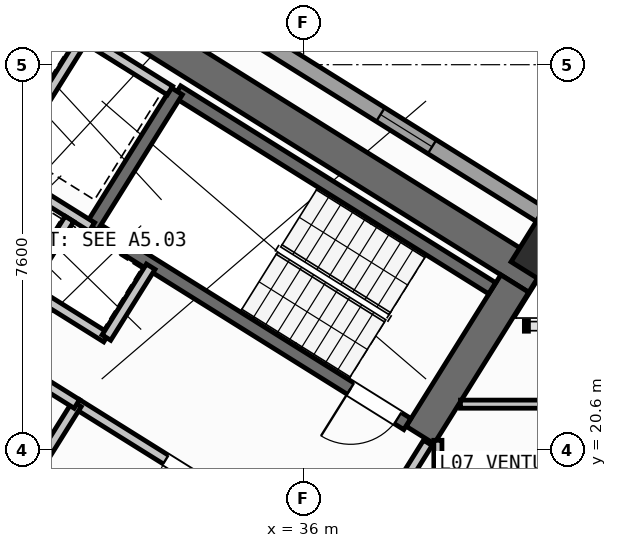
"""IFC4 building model, lengths in metres.
Left out: names, types, materials, properties, quantities, classifications, styles, units other than length and angle.
Written with IfcOpenShell. Run it as: python <this file> out.ifc"""

import sys

from ifc_helpers import new_model, si_unit, direction, frame, frame_2d, origin, origin_2d, place, context, subcontext, project, spatial, rectangle, hollow_rectangle, extrude, source, transform, mapped, element, fill, save


model = new_model("IFC4")
c1 = context("Model", 3, precision=1e-05, world=origin(), true_north=direction((0.0, 1.0)))
c2 = subcontext(c1, "Body", "Model", "MODEL_VIEW")
j1 = project(units=[si_unit("LENGTHUNIT", "METRE"), si_unit("PLANEANGLEUNIT", "RADIAN")], contexts=[c1])
p1 = place(None, origin())
s1 = spatial("IfcSite", under=j1, at=p1, CompositionType="ELEMENT")
p2 = place(p1, origin())
s2 = spatial("IfcBuilding", under=s1, at=p2, CompositionType="ELEMENT")
p3 = place(p2, frame((0.0, 0.0, 31.2)))
s3 = spatial("IfcBuildingStorey", under=s2, at=p3, CompositionType="ELEMENT", Elevation=31.2)
p4 = place(p3, frame((40.615, 23.983, 0.0), z_axis=(0.0, 0.0, 1.0), x_axis=(-0.848045953968, 0.529922692436, 0.0)))
e1 = element("IfcWall", 1, at=p4, inside=s3, PredefinedType="SHEAR", context=c2, shape_type="SweptSolid", body=[
    extrude(rectangle(XDim=13.24, YDim=0.65, at=frame_2d((6.62, 0.0))), origin(), (0.0, 0.0, 1.0), 3.35),
])
p5 = place(p3, frame((40.168, 23.88, 0.0), z_axis=(0.0, 0.0, 1.0), x_axis=(-0.529893103397, -0.8480644427, 0.0)))
e2 = element("IfcWall", 2, at=p5, inside=s3, PredefinedType="SHEAR", context=c2, shape_type="SweptSolid", body=[
    extrude(rectangle(XDim=3.525, YDim=0.65, at=frame_2d((1.763, 0.0))), origin(), (0.0, 0.0, 1.0), 3.35),
])
m1 = source(origin(), c2, "Body", "SweptSolid", [
    extrude(hollow_rectangle(XDim=1.0, YDim=1.0, WallThickness=0.04, at=origin_2d()), origin(), (0.0, 0.0, 1.0), 3.6),
])
p6 = place(p3, frame((40.783, 24.469, 0.0), z_axis=(0.0, 0.0, 1.0), x_axis=(-0.848048096156, 0.529919264233, 0.0)))
e3 = element("IfcColumn", 3, at=p6, inside=s3, PredefinedType="COLUMN", context=c2, shape_type="MappedRepresentation", body=[
    mapped(m1, transform((0.0, 0.0, 0.0), scale=1.0)),
])
p7 = place(p3, frame((14.138, 41.825, 0.0), z_axis=(0.0, 0.0, 1.0), x_axis=(0.848046498049, -0.529921821731, 0.0)))
e4 = element("IfcWall", 4, at=p7, inside=s3, PredefinedType="STANDARD", context=c2, shape_type="SweptSolid", body=[
    extrude(rectangle(XDim=31.588, YDim=0.32, at=frame_2d((15.794, 0.0))), origin(), (0.0, 0.0, 1.0), 3.35),
])
p8 = place(p7, frame((3.369, 0.0, 0.0)))
e5 = element("IfcOpeningElement", 5, at=p8, cuts=e4, PredefinedType="OPENING", context=c2, shape_type="SweptSolid", body=[
    extrude(rectangle(XDim=1.05, YDim=2.15, at=frame_2d((0.525, 1.075))), frame((0.0, 0.17, 0.0), z_axis=(0.0, -1.0, 0.0), x_axis=(1.0, 0.0, 0.0)), (0.0, 0.0, 1.0), 0.34),
])
p9 = place(p7, frame((0.946, 0.0, 0.85)))
e6 = element("IfcOpeningElement", 6, at=p9, cuts=e4, PredefinedType="OPENING", context=c2, shape_type="SweptSolid", body=[
    extrude(rectangle(XDim=1.8, YDim=1.5, at=frame_2d((0.9, 0.75))), frame((0.0, 0.17, 0.0), z_axis=(0.0, -1.0, 0.0), x_axis=(1.0, 0.0, 0.0)), (0.0, 0.0, 1.0), 0.34),
])
p10 = place(p7, frame((8.46, 0.0, 0.85)))
e7 = element("IfcOpeningElement", 7, at=p10, cuts=e4, PredefinedType="OPENING", context=c2, shape_type="SweptSolid", body=[
    extrude(rectangle(XDim=1.8, YDim=1.5, at=frame_2d((0.9, 0.75))), frame((0.0, 0.17, 0.0), z_axis=(0.0, -1.0, 0.0), x_axis=(1.0, 0.0, 0.0)), (0.0, 0.0, 1.0), 0.34),
])
p11 = place(p7, frame((13.899, 0.0, 0.85)))
e8 = element("IfcOpeningElement", 8, at=p11, cuts=e4, PredefinedType="OPENING", context=c2, shape_type="SweptSolid", body=[
    extrude(rectangle(XDim=1.5, YDim=1.5, at=frame_2d((0.75, 0.75))), frame((0.0, 0.17, 0.0), z_axis=(0.0, -1.0, 0.0), x_axis=(1.0, 0.0, 0.0)), (0.0, 0.0, 1.0), 0.34),
])
p12 = place(p7, frame((22.019, 0.0, 0.95)))
e9 = element("IfcOpeningElement", 9, at=p12, cuts=e4, PredefinedType="OPENING", context=c2, shape_type="SweptSolid", body=[
    extrude(rectangle(XDim=1.2, YDim=1.4, at=frame_2d((0.6, 0.7))), frame((0.0, 0.17, 0.0), z_axis=(0.0, -1.0, 0.0), x_axis=(1.0, 0.0, 0.0)), (0.0, 0.0, 1.0), 0.34),
])
p13 = place(p7, frame((27.569, 0.0, 0.95)))
e10 = element("IfcOpeningElement", 10, at=p13, cuts=e4, PredefinedType="OPENING", context=c2, shape_type="SweptSolid", body=[
    extrude(rectangle(XDim=1.2, YDim=1.4, at=frame_2d((0.6, 0.7))), frame((0.0, 0.17, 0.0), z_axis=(0.0, -1.0, 0.0), x_axis=(1.0, 0.0, 0.0)), (0.0, 0.0, 1.0), 0.34),
])
p14 = place(p3, frame((31.28, 18.261, 0.0), z_axis=(0.0, 0.0, 1.0), x_axis=(-0.848051618787, 0.529913626805, 0.0)))
e11 = element("IfcWall", 11, at=p14, inside=s3, PredefinedType="SHEAR", context=c2, shape_type="SweptSolid", body=[
    extrude(rectangle(XDim=7.46, YDim=0.26, at=frame_2d((3.73, 0.0))), origin(), (0.0, 0.0, 1.0), 3.35),
])
p15 = place(p14, frame((0.36, 0.0, 0.0)))
e12 = element("IfcOpeningElement", 12, at=p15, cuts=e11, PredefinedType="OPENING", context=c2, shape_type="SweptSolid", body=[
    extrude(rectangle(XDim=0.86, YDim=2.05, at=frame_2d((0.43, 1.025))), frame((0.0, 0.14, 0.0), z_axis=(0.0, -1.0, 0.0), x_axis=(1.0, 0.0, 0.0)), (0.0, 0.0, 1.0), 0.28),
])
p16 = place(p3, frame((39.721, 23.788, 0.0), z_axis=(0.0, 0.0, 1.0), x_axis=(-0.848054434086, 0.529909121291, 0.0)))
e13 = element("IfcWall", 13, at=p16, inside=s3, PredefinedType="SHEAR", context=c2, shape_type="SweptSolid", body=[
    extrude(rectangle(XDim=7.33, YDim=0.26, at=frame_2d((3.665, 0.0))), origin(), (0.0, 0.0, 1.0), 3.35),
])
p17 = place(p3, frame((38.046, 21.108, 0.0), z_axis=(0.0, 0.0, 1.0), x_axis=(-0.848054434086, 0.529909121291, 0.0)))
e14 = element("IfcWall", 14, at=p17, inside=s3, PredefinedType="SHEAR", context=c2, shape_type="SweptSolid", body=[
    extrude(rectangle(XDim=7.33, YDim=0.26, at=frame_2d((3.665, 0.0))), origin(), (0.0, 0.0, 1.0), 3.35),
])
p18 = place(p17, frame((0.22, 0.0, 0.0)))
e15 = element("IfcOpeningElement", 15, at=p18, cuts=e14, PredefinedType="OPENING", context=c2, shape_type="SweptSolid", body=[
    extrude(rectangle(XDim=1.1, YDim=2.1, at=frame_2d((0.55, 1.05))), frame((0.0, 0.14, 0.0), z_axis=(0.0, -1.0, 0.0), x_axis=(1.0, 0.0, 0.0)), (0.0, 0.0, 1.0), 0.28),
])
p19 = place(p3, frame((33.496, 27.677, 0.0), z_axis=(0.0, 0.0, 1.0), x_axis=(-0.529908658664, -0.84805472316, 0.0)))
e16 = element("IfcWall", 16, at=p19, inside=s3, PredefinedType="SHEAR", context=c2, shape_type="SweptSolid", body=[
    extrude(rectangle(XDim=3.16, YDim=0.26, at=frame_2d((1.58, 0.0))), origin(), (0.0, 0.0, 1.0), 3.35),
])
p20 = place(p3, frame((36.374, 18.474, 0.0), z_axis=(0.0, 0.0, 1.0), x_axis=(-0.848051071577, 0.529914502535, 0.0)))
e17 = element("IfcWall", 17, at=p20, inside=s3, PredefinedType="STANDARD", context=c2, shape_type="SweptSolid", body=[
    extrude(rectangle(XDim=5.718, YDim=0.2, at=frame_2d((2.859, 0.0))), origin(), (0.0, 0.0, 1.0), 3.34),
])
p21 = place(p20, frame((2.498, 0.0, 0.0)))
e18 = element("IfcOpeningElement", 18, at=p21, cuts=e17, PredefinedType="OPENING", context=c2, shape_type="SweptSolid", body=[
    extrude(rectangle(XDim=1.15, YDim=2.1, at=frame_2d((0.575, 1.05))), frame((0.0, 0.11, 0.0), z_axis=(0.0, -1.0, 0.0), x_axis=(1.0, 0.0, 0.0)), (0.0, 0.0, 1.0), 0.22),
])
p22 = place(p3, frame((31.822, 24.998, 0.0), z_axis=(0.0, 0.0, 1.0), x_axis=(-0.848058348634, 0.529902856485, 0.0)))
e19 = element("IfcWall", 19, at=p22, inside=s3, PredefinedType="STANDARD", context=c2, shape_type="SweptSolid", body=[
    extrude(rectangle(XDim=4.568, YDim=0.2, at=frame_2d((2.284, 0.0))), origin(), (0.0, 0.0, 1.0), 3.34),
])
p23 = place(p3, frame((32.108, 22.814, 0.0), z_axis=(0.0, 0.0, 1.0), x_axis=(-0.848042229521, 0.529928652696, 0.0)))
e20 = element("IfcWall", 20, at=p23, inside=s3, PredefinedType="STANDARD", context=c2, shape_type="SweptSolid", body=[
    extrude(rectangle(XDim=5.62, YDim=0.2, at=frame_2d((2.81, 0.0))), origin(), (0.0, 0.0, 1.0), 3.34),
])
p24 = place(p3, frame((32.982, 24.213, 0.0), z_axis=(0.0, 0.0, 1.0), x_axis=(-0.529839334948, -0.84809803628, 0.0)))
e21 = element("IfcWall", 21, at=p24, inside=s3, PredefinedType="STANDARD", context=c2, shape_type="SweptSolid", body=[
    extrude(rectangle(XDim=1.65, YDim=0.2, at=frame_2d((0.825, 0.0))), origin(), (0.0, 0.0, 1.0), 3.34),
])
p25 = place(p3, frame((31.645, 28.716, 0.0), z_axis=(0.0, 0.0, 1.0), x_axis=(-0.52986693015, -0.848080795876, 0.0)))
e22 = element("IfcWall", 22, at=p25, inside=s3, PredefinedType="STANDARD", context=c2, shape_type="SweptSolid", body=[
    extrude(rectangle(XDim=2.66, YDim=0.2, at=frame_2d((1.33, 0.0))), origin(), (0.0, 0.0, 1.0), 3.34),
])
p26 = place(p3, frame((33.363, 27.69, 0.0), z_axis=(0.0, 0.0, 1.0), x_axis=(-0.848053806312, 0.529910125964, 0.0)))
e23 = element("IfcWall", 23, at=p26, inside=s3, PredefinedType="STANDARD", context=c2, shape_type="SweptSolid", body=[
    extrude(rectangle(XDim=4.448, YDim=0.2, at=frame_2d((2.224, 0.0))), origin(), (0.0, 0.0, 1.0), 3.34),
])
p27 = place(p3, frame((31.379, 25.156, 0.0), z_axis=(0.0, 0.0, 1.0), x_axis=(-0.529998940003, -0.847998304005, 0.0)))
e24 = element("IfcWall", 24, at=p27, inside=s3, PredefinedType="STANDARD", context=c2, shape_type="SweptSolid", body=[
    extrude(rectangle(XDim=1.58, YDim=0.2, at=frame_2d((0.79, 0.0))), origin(), (0.0, 0.0, 1.0), 3.34),
])
p28 = place(p3, frame((31.525, 21.504, 0.0), z_axis=(0.0, 0.0, 1.0), x_axis=(-0.529907497854, -0.848055448493, 0.0)))
e25 = element("IfcWall", 25, at=p28, inside=s3, PredefinedType="STANDARD", context=c2, shape_type="SweptSolid", body=[
    extrude(rectangle(XDim=2.88, YDim=0.2, at=frame_2d((1.44, 0.0))), origin(), (0.0, 0.0, 1.0), 3.34),
])
p29 = place(p3, frame((31.525, 21.504, 0.0), z_axis=(0.0, 0.0, 1.0), x_axis=(-0.848044998614, 0.529924221305, 0.0)))
e26 = element("IfcWall", 26, at=p29, inside=s3, PredefinedType="STANDARD", context=c2, shape_type="SweptSolid", body=[
    extrude(rectangle(XDim=6.168, YDim=0.2, at=frame_2d((3.084, 0.0))), origin(), (0.0, 0.0, 1.0), 3.34),
])
p30 = place(p29, frame((4.4, 0.0, 0.0)))
e27 = element("IfcOpeningElement", 27, at=p30, cuts=e26, PredefinedType="OPENING", context=c2, shape_type="SweptSolid", body=[
    extrude(rectangle(XDim=0.86, YDim=2.05, at=frame_2d((0.43, 1.025))), frame((0.0, 0.11, 0.0), z_axis=(0.0, -1.0, 0.0), x_axis=(1.0, 0.0, 0.0)), (0.0, 0.0, 1.0), 0.22),
])
p31 = place(p29, frame((1.45, 0.0, 0.0)))
e28 = element("IfcOpeningElement", 28, at=p31, cuts=e26, PredefinedType="OPENING", context=c2, shape_type="SweptSolid", body=[
    extrude(rectangle(XDim=0.86, YDim=2.05, at=frame_2d((0.43, 1.025))), frame((0.0, 0.11, 0.0), z_axis=(0.0, -1.0, 0.0), x_axis=(1.0, 0.0, 0.0)), (0.0, 0.0, 1.0), 0.22),
])
p32 = place(p3, frame((38.451, 20.737, 0.0), z_axis=(0.0, 0.0, 1.0), x_axis=(-0.529924799939, -0.848044637038, 0.0)))
e29 = element("IfcWall", 29, at=p32, inside=s3, PredefinedType="STANDARD", context=c2, shape_type="SweptSolid", body=[
    extrude(rectangle(XDim=2.96, YDim=0.2, at=frame_2d((1.48, 0.0))), origin(), (0.0, 0.0, 1.0), 3.34),
])
p33 = place(p32, frame((1.46, 0.0, 0.0)))
e30 = element("IfcOpeningElement", 30, at=p33, cuts=e29, PredefinedType="OPENING", context=c2, shape_type="SweptSolid", body=[
    extrude(rectangle(XDim=0.86, YDim=2.05, at=frame_2d((0.43, 1.025))), frame((0.0, 0.11, 0.0), z_axis=(0.0, -1.0, 0.0), x_axis=(1.0, 0.0, 0.0)), (0.0, 0.0, 1.0), 0.22),
])
p34 = place(p3, frame((38.65, 17.93, 0.0), z_axis=(0.0, 0.0, 1.0), x_axis=(0.0, 1.0, 0.0)))
e31 = element("IfcWall", 31, at=p34, inside=s3, PredefinedType="PARTITIONING", context=c2, shape_type="SweptSolid", body=[
    extrude(rectangle(XDim=2.857, YDim=0.16, at=frame_2d((1.428, 0.0))), origin(), (0.0, 0.0, 1.0), 3.34),
])
p35 = place(p3, frame((39.095, 21.5, 0.0), z_axis=(0.0, 0.0, 1.0), x_axis=(1.0, 0.0, 0.0)))
e32 = element("IfcWall", 32, at=p35, inside=s3, PredefinedType="PARTITIONING", context=c2, shape_type="SweptSolid", body=[
    extrude(rectangle(XDim=7.094, YDim=0.16, at=frame_2d((3.547, 0.0))), origin(), (0.0, 0.0, 1.0), 3.34),
])
m2 = source(origin(), c2, "Body", "SweptSolid", [
    extrude(rectangle(XDim=1.2, YDim=1.4, at=frame_2d((0.6, 0.7))), frame((0.0, 0.03, 0.0), z_axis=(0.0, -1.0, 0.0), x_axis=(1.0, 0.0, 0.0)), (0.0, 0.0, 1.0), 0.06),
])
p36 = place(p13, origin())
e33 = element("IfcWindow", 33, at=p36, inside=s3, PartitioningType="SINGLE_PANEL", PredefinedType="WINDOW", context=c2, shape_type="MappedRepresentation", body=[
    mapped(m2, transform((0.0, 0.0, 0.0), scale=1.0)),
])
fill(e10, e33)
m3 = source(origin(), c2, "Body", "SweptSolid", [
    extrude(rectangle(XDim=1.1, YDim=2.1, at=frame_2d((0.55, 1.05))), frame((0.0, 0.025, 0.0), z_axis=(0.0, -1.0, 0.0), x_axis=(1.0, 0.0, 0.0)), (0.0, 0.0, 1.0), 0.05),
])
p37 = place(p18, origin())
e34 = element("IfcDoor", 34, at=p37, inside=s3, OperationType="SINGLE_SWING_RIGHT", PredefinedType="DOOR", context=c2, shape_type="MappedRepresentation", body=[
    mapped(m3, transform((0.0, 0.0, 0.0), scale=1.0)),
])
fill(e15, e34)
m4 = source(origin(), c2, "Body", "SweptSolid", [
    extrude(rectangle(XDim=1.15, YDim=2.1, at=frame_2d((0.575, 1.05))), frame((0.0, 0.025, 0.0), z_axis=(0.0, -1.0, 0.0), x_axis=(1.0, 0.0, 0.0)), (0.0, 0.0, 1.0), 0.05),
])
p38 = place(p21, origin())
e35 = element("IfcDoor", 35, at=p38, inside=s3, OperationType="SINGLE_SWING_LEFT", PredefinedType="DOOR", context=c2, shape_type="MappedRepresentation", body=[
    mapped(m4, transform((0.0, 0.0, 0.0), scale=1.0)),
])
fill(e18, e35)
save(model, sys.argv[1])
